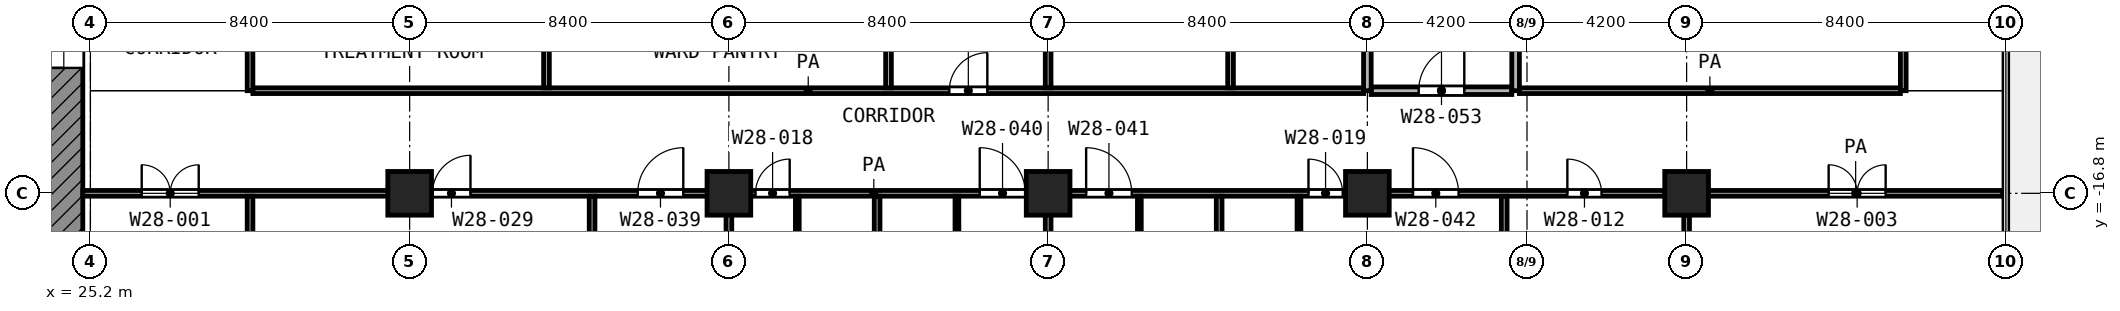
"""IFC4 building model, lengths in metres.
Left out: names, types, materials, properties, quantities, classifications, styles, units other than length and angle.
Written with IfcOpenShell. Run it as: python <this file> out.ifc"""

import sys

from ifc_helpers import new_model, si_unit, direction, frame, frame_2d, origin, origin_2d, place, context, subcontext, project, spatial, rectangle, extrude, element, fill, save


model = new_model("IFC4")
c1 = context("Model", 3, precision=1e-05, world=origin(), true_north=direction((0.0, 1.0)))
c2 = subcontext(c1, "Body", "Model", "MODEL_VIEW")
j1 = project(units=[si_unit("LENGTHUNIT", "METRE"), si_unit("PLANEANGLEUNIT", "RADIAN")], contexts=[c1])
p1 = place(None, origin())
s1 = spatial("IfcSite", under=j1, at=p1, CompositionType="ELEMENT")
p2 = place(p1, origin())
s2 = spatial("IfcBuilding", under=s1, at=p2, CompositionType="ELEMENT")
p3 = place(p2, frame((0.0, 0.0, 124.0)))
s3 = spatial("IfcBuildingStorey", under=s2, at=p3, CompositionType="ELEMENT", Elevation=124.0)
for number, where, z_axis, x_axis in (
    (1, (33.6, -16.8, 0.0), (0.0, 0.0, 1.0), (1.0, 0.0, 0.0)),
    (2, (42.0, -16.8, 0.0), (0.0, 0.0, 1.0), (1.0, 0.0, 0.0)),
    (3, (50.4, -16.8, 0.0), (0.0, 0.0, 1.0), (1.0, 0.0, 0.0)),
    (4, (58.8, -16.8, 0.0), (0.0, 0.0, 1.0), (1.0, 0.0, 0.0)),
    (5, (67.2, -16.8, 0.0), (0.0, 0.0, 1.0), (1.0, 0.0, 0.0)),
):
    element("IfcColumn", number, at=place(p3, frame(where, z_axis=z_axis, x_axis=x_axis)), inside=s3, PredefinedType="COLUMN", context=c2, shape_type="SweptSolid", body=[
        extrude(rectangle(XDim=1.15, YDim=1.15, at=origin_2d()), origin(), (0.0, 0.0, 1.0), 4.2),
    ])
p4 = place(p3, frame((24.5, -24.0, 0.0), z_axis=(0.0, 0.0, 1.0), x_axis=(0.0, 1.0, 0.0)))
e6 = element("IfcWall", 6, at=p4, inside=s3, PredefinedType="SHEAR", context=c2, shape_type="SweptSolid", body=[
    extrude(rectangle(XDim=18.6, YDim=1.0, at=frame_2d((9.3, 0.0))), origin(), (0.0, 0.0, 1.0), 3.6),
])
p5 = place(p4, frame((10.5, 0.0, 0.0)))
e7 = element("IfcOpeningElement", 7, at=p5, cuts=e6, PredefinedType="OPENING", context=c2, shape_type="SweptSolid", body=[
    extrude(rectangle(XDim=1.8, YDim=2.1, at=frame_2d((0.9, 1.05))), frame((0.0, 0.51, 0.0), z_axis=(0.0, -1.0, 0.0), x_axis=(1.0, 0.0, 0.0)), (0.0, 0.0, 1.0), 1.02),
])
for number, where, z_axis, x_axis in (
    (8, (43.8, -19.5, 0.0), (0.0, 0.0, 1.0), (0.0, 1.0, 0.0)),
    (9, (48.0, -19.5, 0.0), (0.0, 0.0, 1.0), (0.0, 1.0, 0.0)),
    (10, (52.8, -19.5, 0.0), (0.0, 0.0, 1.0), (0.0, 1.0, 0.0)),
):
    element("IfcWall", number, at=place(p3, frame(where, z_axis=z_axis, x_axis=x_axis)), inside=s3, PredefinedType="PARTITIONING", context=c2, shape_type="SweptSolid", body=[
        extrude(rectangle(XDim=2.625, YDim=0.1, at=frame_2d((1.312, 0.0))), origin(), (0.0, 0.0, 1.0), 3.6),
    ])
p6 = place(p3, frame((57.0, -19.499, 0.0), z_axis=(0.0, 0.0, 1.0), x_axis=(0.0, 1.0, 0.0)))
e11 = element("IfcWall", 11, at=p6, inside=s3, PredefinedType="PARTITIONING", context=c2, shape_type="SweptSolid", body=[
    extrude(rectangle(XDim=2.624, YDim=0.1, at=frame_2d((1.312, 0.0))), origin(), (0.0, 0.0, 1.0), 3.6),
])
p7 = place(p3, frame((25.0, -16.8, 0.0), z_axis=(0.0, 0.0, 1.0), x_axis=(1.0, 0.0, 0.0)))
e12 = element("IfcWall", 12, at=p7, inside=s3, PredefinedType="PARTITIONING", context=c2, shape_type="SweptSolid", body=[
    extrude(rectangle(XDim=41.625, YDim=0.15, at=frame_2d((20.812, 0.0))), origin(), (0.0, 0.0, 1.0), 3.6),
])
p8 = place(p7, frame((1.55, 0.0, 0.0)))
e13 = element("IfcOpeningElement", 13, at=p8, cuts=e12, PredefinedType="OPENING", context=c2, shape_type="SweptSolid", body=[
    extrude(rectangle(XDim=1.5, YDim=2.1, at=frame_2d((0.75, 1.05))), frame((0.0, 0.085, 0.0), z_axis=(0.0, -1.0, 0.0), x_axis=(1.0, 0.0, 0.0)), (0.0, 0.0, 1.0), 0.17),
])
p9 = place(p7, frame((9.2, 0.0, 0.0)))
e14 = element("IfcOpeningElement", 14, at=p9, cuts=e12, PredefinedType="OPENING", context=c2, shape_type="SweptSolid", body=[
    extrude(rectangle(XDim=1.0, YDim=2.1, at=frame_2d((0.5, 1.05))), frame((0.0, 0.085, 0.0), z_axis=(0.0, -1.0, 0.0), x_axis=(1.0, 0.0, 0.0)), (0.0, 0.0, 1.0), 0.17),
])
p10 = place(p7, frame((14.6, 0.0, 0.0)))
e15 = element("IfcOpeningElement", 15, at=p10, cuts=e12, PredefinedType="OPENING", context=c2, shape_type="SweptSolid", body=[
    extrude(rectangle(XDim=1.2, YDim=2.1, at=frame_2d((0.6, 1.05))), frame((0.0, 0.085, 0.0), z_axis=(0.0, -1.0, 0.0), x_axis=(1.0, 0.0, 0.0)), (0.0, 0.0, 1.0), 0.17),
])
p11 = place(p7, frame((17.7, 0.0, 0.0)))
e16 = element("IfcOpeningElement", 16, at=p11, cuts=e12, PredefinedType="OPENING", context=c2, shape_type="SweptSolid", body=[
    extrude(rectangle(XDim=0.9, YDim=2.1, at=frame_2d((0.45, 1.05))), frame((0.0, 0.085, 0.0), z_axis=(0.0, -1.0, 0.0), x_axis=(1.0, 0.0, 0.0)), (0.0, 0.0, 1.0), 0.17),
])
p12 = place(p7, frame((23.6, 0.0, 0.0)))
e17 = element("IfcOpeningElement", 17, at=p12, cuts=e12, PredefinedType="OPENING", context=c2, shape_type="SweptSolid", body=[
    extrude(rectangle(XDim=1.2, YDim=2.1, at=frame_2d((0.6, 1.05))), frame((0.0, 0.085, 0.0), z_axis=(0.0, -1.0, 0.0), x_axis=(1.0, 0.0, 0.0)), (0.0, 0.0, 1.0), 0.17),
])
p13 = place(p7, frame((26.4, 0.0, 0.0)))
e18 = element("IfcOpeningElement", 18, at=p13, cuts=e12, PredefinedType="OPENING", context=c2, shape_type="SweptSolid", body=[
    extrude(rectangle(XDim=1.2, YDim=2.1, at=frame_2d((0.6, 1.05))), frame((0.0, 0.085, 0.0), z_axis=(0.0, -1.0, 0.0), x_axis=(1.0, 0.0, 0.0)), (0.0, 0.0, 1.0), 0.17),
])
p14 = place(p7, frame((35.0, 0.0, 0.0)))
e19 = element("IfcOpeningElement", 19, at=p14, cuts=e12, PredefinedType="OPENING", context=c2, shape_type="SweptSolid", body=[
    extrude(rectangle(XDim=1.2, YDim=2.1, at=frame_2d((0.6, 1.05))), frame((0.0, 0.085, 0.0), z_axis=(0.0, -1.0, 0.0), x_axis=(1.0, 0.0, 0.0)), (0.0, 0.0, 1.0), 0.17),
])
p15 = place(p7, frame((32.25, 0.0, 0.0)))
e20 = element("IfcOpeningElement", 20, at=p15, cuts=e12, PredefinedType="OPENING", context=c2, shape_type="SweptSolid", body=[
    extrude(rectangle(XDim=0.9, YDim=2.1, at=frame_2d((0.45, 1.05))), frame((0.0, 0.085, 0.0), z_axis=(0.0, -1.0, 0.0), x_axis=(1.0, 0.0, 0.0)), (0.0, 0.0, 1.0), 0.17),
])
p16 = place(p7, frame((39.062, 0.0, 0.0)))
e21 = element("IfcOpeningElement", 21, at=p16, cuts=e12, PredefinedType="OPENING", context=c2, shape_type="SweptSolid", body=[
    extrude(rectangle(XDim=0.9, YDim=2.1, at=frame_2d((0.45, 1.05))), frame((0.0, 0.085, 0.0), z_axis=(0.0, -1.0, 0.0), x_axis=(1.0, 0.0, 0.0)), (0.0, 0.0, 1.0), 0.17),
])
p17 = place(p3, frame((67.775, -16.8, 0.0), z_axis=(0.0, 0.0, 1.0), x_axis=(1.0, 0.0, 0.0)))
e22 = element("IfcWall", 22, at=p17, inside=s3, PredefinedType="PARTITIONING", context=c2, shape_type="SweptSolid", body=[
    extrude(rectangle(XDim=7.745, YDim=0.15, at=frame_2d((3.873, 0.0))), origin(), (0.0, 0.0, 1.0), 3.6),
])
p18 = place(p17, frame((3.162, 0.0, 0.0)))
e23 = element("IfcOpeningElement", 23, at=p18, cuts=e22, PredefinedType="OPENING", context=c2, shape_type="SweptSolid", body=[
    extrude(rectangle(XDim=1.5, YDim=2.1, at=frame_2d((0.75, 1.05))), frame((0.0, 0.085, 0.0), z_axis=(0.0, -1.0, 0.0), x_axis=(1.0, 0.0, 0.0)), (0.0, 0.0, 1.0), 0.17),
])
p19 = place(p3, frame((29.475, -14.1, 0.0), z_axis=(0.0, 0.0, 1.0), x_axis=(1.0, 0.0, 0.0)))
e24 = element("IfcWall", 24, at=p19, inside=s3, PredefinedType="PARTITIONING", context=c2, shape_type="SweptSolid", body=[
    extrude(rectangle(XDim=29.225, YDim=0.15, at=frame_2d((14.612, 0.0))), origin(), (0.0, 0.0, 1.0), 3.6),
])
p20 = place(p19, frame((18.325, 0.0, 0.0)))
e25 = element("IfcOpeningElement", 25, at=p20, cuts=e24, PredefinedType="OPENING", context=c2, shape_type="SweptSolid", body=[
    extrude(rectangle(XDim=1.0, YDim=2.1, at=frame_2d((0.5, 1.05))), frame((0.0, 0.085, 0.0), z_axis=(0.0, -1.0, 0.0), x_axis=(1.0, 0.0, 0.0)), (0.0, 0.0, 1.0), 0.17),
])
p21 = place(p3, frame((62.8, -14.1, 0.0), z_axis=(0.0, 0.0, 1.0), x_axis=(1.0, 0.0, 0.0)))
e26 = element("IfcWall", 26, at=p21, inside=s3, PredefinedType="PARTITIONING", context=c2, shape_type="SweptSolid", body=[
    extrude(rectangle(XDim=10.025, YDim=0.15, at=frame_2d((5.012, 0.0))), origin(), (0.0, 0.0, 1.0), 3.6),
])
p22 = place(p3, frame((29.4, -25.2, 0.0), z_axis=(0.0, 0.0, 1.0), x_axis=(0.0, 1.0, 0.0)))
e27 = element("IfcWall", 27, at=p22, inside=s3, PredefinedType="PARTITIONING", context=c2, shape_type="SweptSolid", body=[
    extrude(rectangle(XDim=8.325, YDim=0.15, at=frame_2d((4.163, 0.0))), origin(), (0.0, 0.0, 1.0), 3.6),
])
p23 = place(p3, frame((29.4, -14.1, 0.0), z_axis=(0.0, 0.0, 1.0), x_axis=(0.0, 1.0, 0.0)))
e28 = element("IfcWall", 28, at=p23, inside=s3, PredefinedType="PARTITIONING", context=c2, shape_type="SweptSolid", body=[
    extrude(rectangle(XDim=3.0, YDim=0.15, at=frame_2d((1.5, 0.0))), origin(), (0.0, 0.0, 1.0), 3.6),
])
p24 = place(p3, frame((37.2, -14.025, 0.0), z_axis=(0.0, 0.0, 1.0), x_axis=(0.0, 1.0, 0.0)))
e29 = element("IfcWall", 29, at=p24, inside=s3, PredefinedType="PARTITIONING", context=c2, shape_type="SweptSolid", body=[
    extrude(rectangle(XDim=2.85, YDim=0.15, at=frame_2d((1.425, 0.0))), origin(), (0.0, 0.0, 1.0), 3.6),
])
p25 = place(p3, frame((38.4, -25.12, 0.0), z_axis=(0.0, 0.0, 1.0), x_axis=(0.0, 1.0, 0.0)))
e30 = element("IfcWall", 30, at=p25, inside=s3, PredefinedType="PARTITIONING", context=c2, shape_type="SweptSolid", body=[
    extrude(rectangle(XDim=8.245, YDim=0.15, at=frame_2d((4.123, 0.0))), origin(), (0.0, 0.0, 1.0), 2.7),
])
p26 = place(p3, frame((42.0, -25.12, 0.0), z_axis=(0.0, 0.0, 1.0), x_axis=(0.0, 1.0, 0.0)))
e31 = element("IfcWall", 31, at=p26, inside=s3, PredefinedType="PARTITIONING", context=c2, shape_type="SweptSolid", body=[
    extrude(rectangle(XDim=8.245, YDim=0.15, at=frame_2d((4.123, 0.0))), origin(), (0.0, 0.0, 1.0), 3.6),
])
p27 = place(p3, frame((45.9, -25.12, 0.0), z_axis=(0.0, 0.0, 1.0), x_axis=(0.0, 1.0, 0.0)))
e32 = element("IfcWall", 32, at=p27, inside=s3, PredefinedType="PARTITIONING", context=c2, shape_type="SweptSolid", body=[
    extrude(rectangle(XDim=8.245, YDim=0.15, at=frame_2d((4.123, 0.0))), origin(), (0.0, 0.0, 1.0), 2.7),
])
p28 = place(p3, frame((46.2, -14.025, 0.0), z_axis=(0.0, 0.0, 1.0), x_axis=(0.0, 1.0, 0.0)))
e33 = element("IfcWall", 33, at=p28, inside=s3, PredefinedType="PARTITIONING", context=c2, shape_type="SweptSolid", body=[
    extrude(rectangle(XDim=2.85, YDim=0.15, at=frame_2d((1.425, 0.0))), origin(), (0.0, 0.0, 1.0), 3.6),
])
p29 = place(p3, frame((50.4, -25.12, 0.0), z_axis=(0.0, 0.0, 1.0), x_axis=(0.0, 1.0, 0.0)))
e34 = element("IfcWall", 34, at=p29, inside=s3, PredefinedType="PARTITIONING", context=c2, shape_type="SweptSolid", body=[
    extrude(rectangle(XDim=8.245, YDim=0.15, at=frame_2d((4.123, 0.0))), origin(), (0.0, 0.0, 1.0), 3.6),
])
p30 = place(p3, frame((50.4, -14.025, 0.0), z_axis=(0.0, 0.0, 1.0), x_axis=(0.0, 1.0, 0.0)))
e35 = element("IfcWall", 35, at=p30, inside=s3, PredefinedType="PARTITIONING", context=c2, shape_type="SweptSolid", body=[
    extrude(rectangle(XDim=2.85, YDim=0.15, at=frame_2d((1.425, 0.0))), origin(), (0.0, 0.0, 1.0), 3.6),
])
p31 = place(p3, frame((54.9, -25.12, 0.0), z_axis=(0.0, 0.0, 1.0), x_axis=(0.0, 1.0, 0.0)))
e36 = element("IfcWall", 36, at=p31, inside=s3, PredefinedType="PARTITIONING", context=c2, shape_type="SweptSolid", body=[
    extrude(rectangle(XDim=8.245, YDim=0.15, at=frame_2d((4.123, 0.0))), origin(), (0.0, 0.0, 1.0), 2.7),
])
p32 = place(p3, frame((55.2, -14.025, 0.0), z_axis=(0.0, 0.0, 1.0), x_axis=(0.0, 1.0, 0.0)))
e37 = element("IfcWall", 37, at=p32, inside=s3, PredefinedType="PARTITIONING", context=c2, shape_type="SweptSolid", body=[
    extrude(rectangle(XDim=2.85, YDim=0.15, at=frame_2d((1.425, 0.0))), origin(), (0.0, 0.0, 1.0), 3.6),
])
p33 = place(p3, frame((62.4, -25.12, 0.0), z_axis=(0.0, 0.0, 1.0), x_axis=(0.0, 1.0, 0.0)))
e38 = element("IfcWall", 38, at=p33, inside=s3, PredefinedType="PARTITIONING", context=c2, shape_type="SweptSolid", body=[
    extrude(rectangle(XDim=8.245, YDim=0.15, at=frame_2d((4.123, 0.0))), origin(), (0.0, 0.0, 1.0), 2.7),
])
p34 = place(p3, frame((67.2, -25.12, 0.0), z_axis=(0.0, 0.0, 1.0), x_axis=(0.0, 1.0, 0.0)))
e39 = element("IfcWall", 39, at=p34, inside=s3, PredefinedType="PARTITIONING", context=c2, shape_type="SweptSolid", body=[
    extrude(rectangle(XDim=7.745, YDim=0.15, at=frame_2d((3.873, 0.0))), origin(), (0.0, 0.0, 1.0), 2.7),
])
p35 = place(p3, frame((72.9, -14.1, 0.0), z_axis=(0.0, 0.0, 1.0), x_axis=(0.0, 1.0, 0.0)))
e40 = element("IfcWall", 40, at=p35, inside=s3, PredefinedType="PARTITIONING", context=c2, shape_type="SweptSolid", body=[
    extrude(rectangle(XDim=3.0, YDim=0.15, at=frame_2d((1.5, 0.0))), origin(), (0.0, 0.0, 1.0), 3.6),
])
p36 = place(p3, frame((58.9, -14.1, 0.0), z_axis=(0.0, 0.0, 1.0), x_axis=(1.0, 0.0, 0.0)))
e41 = element("IfcWall", 41, at=p36, inside=s3, PredefinedType="PARTITIONING", context=c2, shape_type="SweptSolid", body=[
    extrude(rectangle(XDim=3.7, YDim=0.2, at=frame_2d((1.85, 0.0))), origin(), (0.0, 0.0, 1.0), 3.6),
])
p37 = place(p36, frame((1.25, 0.0, 0.0)))
e42 = element("IfcOpeningElement", 42, at=p37, cuts=e41, PredefinedType="OPENING", context=c2, shape_type="SweptSolid", body=[
    extrude(rectangle(XDim=1.2, YDim=2.1, at=frame_2d((0.6, 1.05))), frame((0.0, 0.11, 0.0), z_axis=(0.0, -1.0, 0.0), x_axis=(1.0, 0.0, 0.0)), (0.0, 0.0, 1.0), 0.22),
])
for number, where, z_axis, x_axis in (
    (43, (58.8, -14.1, 0.0), (0.0, 0.0, 1.0), (0.0, 1.0, 0.0)),
    (44, (62.7, -14.1, 0.0), (0.0, 0.0, 1.0), (0.0, 1.0, 0.0)),
):
    element("IfcWall", number, at=place(p3, frame(where, z_axis=z_axis, x_axis=x_axis)), inside=s3, PredefinedType="PARTITIONING", context=c2, shape_type="SweptSolid", body=[
        extrude(rectangle(XDim=3.0, YDim=0.2, at=frame_2d((1.5, 0.0))), origin(), (0.0, 0.0, 1.0), 3.6),
    ])
p38 = place(p5, origin())
e45 = element("IfcDoor", 45, at=p38, inside=s3, OperationType="DOUBLE_DOOR_SINGLE_SWING", PredefinedType="DOOR", context=c2, shape_type="SweptSolid", body=[
    extrude(rectangle(XDim=1.8, YDim=2.1, at=frame_2d((0.9, 1.05))), frame((0.0, 0.025, 0.0), z_axis=(0.0, -1.0, 0.0), x_axis=(1.0, 0.0, 0.0)), (0.0, 0.0, 1.0), 0.05),
])
fill(e7, e45)
p39 = place(p8, origin())
e46 = element("IfcDoor", 46, at=p39, inside=s3, OperationType="DOUBLE_DOOR_SINGLE_SWING", PredefinedType="DOOR", context=c2, shape_type="SweptSolid", body=[
    extrude(rectangle(XDim=1.5, YDim=2.1, at=frame_2d((0.75, 1.05))), frame((0.0, 0.025, 0.0), z_axis=(0.0, -1.0, 0.0), x_axis=(1.0, 0.0, 0.0)), (0.0, 0.0, 1.0), 0.05),
])
fill(e13, e46)
p40 = place(p20, origin())
e47 = element("IfcDoor", 47, at=p40, inside=s3, OperationType="SINGLE_SWING_RIGHT", PredefinedType="DOOR", context=c2, shape_type="SweptSolid", body=[
    extrude(rectangle(XDim=1.0, YDim=2.1, at=frame_2d((0.5, 1.05))), frame((0.0, 0.025, 0.0), z_axis=(0.0, -1.0, 0.0), x_axis=(1.0, 0.0, 0.0)), (0.0, 0.0, 1.0), 0.05),
])
fill(e25, e47)
p41 = place(p37, origin())
e48 = element("IfcDoor", 48, at=p41, inside=s3, OperationType="SINGLE_SWING_RIGHT", PredefinedType="DOOR", context=c2, shape_type="SweptSolid", body=[
    extrude(rectangle(XDim=1.2, YDim=2.1, at=frame_2d((0.6, 1.05))), frame((0.0, 0.025, 0.0), z_axis=(0.0, -1.0, 0.0), x_axis=(1.0, 0.0, 0.0)), (0.0, 0.0, 1.0), 0.05),
])
fill(e42, e48)
p42 = place(p9, origin())
e49 = element("IfcDoor", 49, at=p42, inside=s3, OperationType="SINGLE_SWING_RIGHT", PredefinedType="DOOR", context=c2, shape_type="SweptSolid", body=[
    extrude(rectangle(XDim=1.0, YDim=2.1, at=frame_2d((0.5, 1.05))), frame((0.0, 0.025, 0.0), z_axis=(0.0, -1.0, 0.0), x_axis=(1.0, 0.0, 0.0)), (0.0, 0.0, 1.0), 0.05),
])
fill(e14, e49)
p43 = place(p10, origin())
e50 = element("IfcDoor", 50, at=p43, inside=s3, OperationType="SINGLE_SWING_RIGHT", PredefinedType="DOOR", context=c2, shape_type="SweptSolid", body=[
    extrude(rectangle(XDim=1.2, YDim=2.1, at=frame_2d((0.6, 1.05))), frame((0.0, 0.025, 0.0), z_axis=(0.0, -1.0, 0.0), x_axis=(1.0, 0.0, 0.0)), (0.0, 0.0, 1.0), 0.05),
])
fill(e15, e50)
p44 = place(p11, origin())
e51 = element("IfcDoor", 51, at=p44, inside=s3, OperationType="SINGLE_SWING_RIGHT", PredefinedType="DOOR", context=c2, shape_type="SweptSolid", body=[
    extrude(rectangle(XDim=0.9, YDim=2.1, at=frame_2d((0.45, 1.05))), frame((0.0, 0.025, 0.0), z_axis=(0.0, -1.0, 0.0), x_axis=(1.0, 0.0, 0.0)), (0.0, 0.0, 1.0), 0.05),
])
fill(e16, e51)
p45 = place(p12, origin())
e52 = element("IfcDoor", 52, at=p45, inside=s3, OperationType="SINGLE_SWING_LEFT", PredefinedType="DOOR", context=c2, shape_type="SweptSolid", body=[
    extrude(rectangle(XDim=1.2, YDim=2.1, at=frame_2d((0.6, 1.05))), frame((0.0, 0.025, 0.0), z_axis=(0.0, -1.0, 0.0), x_axis=(1.0, 0.0, 0.0)), (0.0, 0.0, 1.0), 0.05),
])
fill(e17, e52)
p46 = place(p13, origin())
e53 = element("IfcDoor", 53, at=p46, inside=s3, OperationType="SINGLE_SWING_LEFT", PredefinedType="DOOR", context=c2, shape_type="SweptSolid", body=[
    extrude(rectangle(XDim=1.2, YDim=2.1, at=frame_2d((0.6, 1.05))), frame((0.0, 0.025, 0.0), z_axis=(0.0, -1.0, 0.0), x_axis=(1.0, 0.0, 0.0)), (0.0, 0.0, 1.0), 0.05),
])
fill(e18, e53)
p47 = place(p14, origin())
e54 = element("IfcDoor", 54, at=p47, inside=s3, OperationType="SINGLE_SWING_LEFT", PredefinedType="DOOR", context=c2, shape_type="SweptSolid", body=[
    extrude(rectangle(XDim=1.2, YDim=2.1, at=frame_2d((0.6, 1.05))), frame((0.0, 0.025, 0.0), z_axis=(0.0, -1.0, 0.0), x_axis=(1.0, 0.0, 0.0)), (0.0, 0.0, 1.0), 0.05),
])
fill(e19, e54)
p48 = place(p15, origin())
e55 = element("IfcDoor", 55, at=p48, inside=s3, OperationType="SINGLE_SWING_LEFT", PredefinedType="DOOR", context=c2, shape_type="SweptSolid", body=[
    extrude(rectangle(XDim=0.9, YDim=2.1, at=frame_2d((0.45, 1.05))), frame((0.0, 0.025, 0.0), z_axis=(0.0, -1.0, 0.0), x_axis=(1.0, 0.0, 0.0)), (0.0, 0.0, 1.0), 0.05),
])
fill(e20, e55)
p49 = place(p16, origin())
e56 = element("IfcDoor", 56, at=p49, inside=s3, OperationType="SINGLE_SWING_LEFT", PredefinedType="DOOR", context=c2, shape_type="SweptSolid", body=[
    extrude(rectangle(XDim=0.9, YDim=2.1, at=frame_2d((0.45, 1.05))), frame((0.0, 0.025, 0.0), z_axis=(0.0, -1.0, 0.0), x_axis=(1.0, 0.0, 0.0)), (0.0, 0.0, 1.0), 0.05),
])
fill(e21, e56)
p50 = place(p18, origin())
e57 = element("IfcDoor", 57, at=p50, inside=s3, OperationType="DOUBLE_DOOR_SINGLE_SWING", PredefinedType="DOOR", context=c2, shape_type="SweptSolid", body=[
    extrude(rectangle(XDim=1.5, YDim=2.1, at=frame_2d((0.75, 1.05))), frame((0.0, 0.025, 0.0), z_axis=(0.0, -1.0, 0.0), x_axis=(1.0, 0.0, 0.0)), (0.0, 0.0, 1.0), 0.05),
])
fill(e23, e57)
save(model, sys.argv[1])
